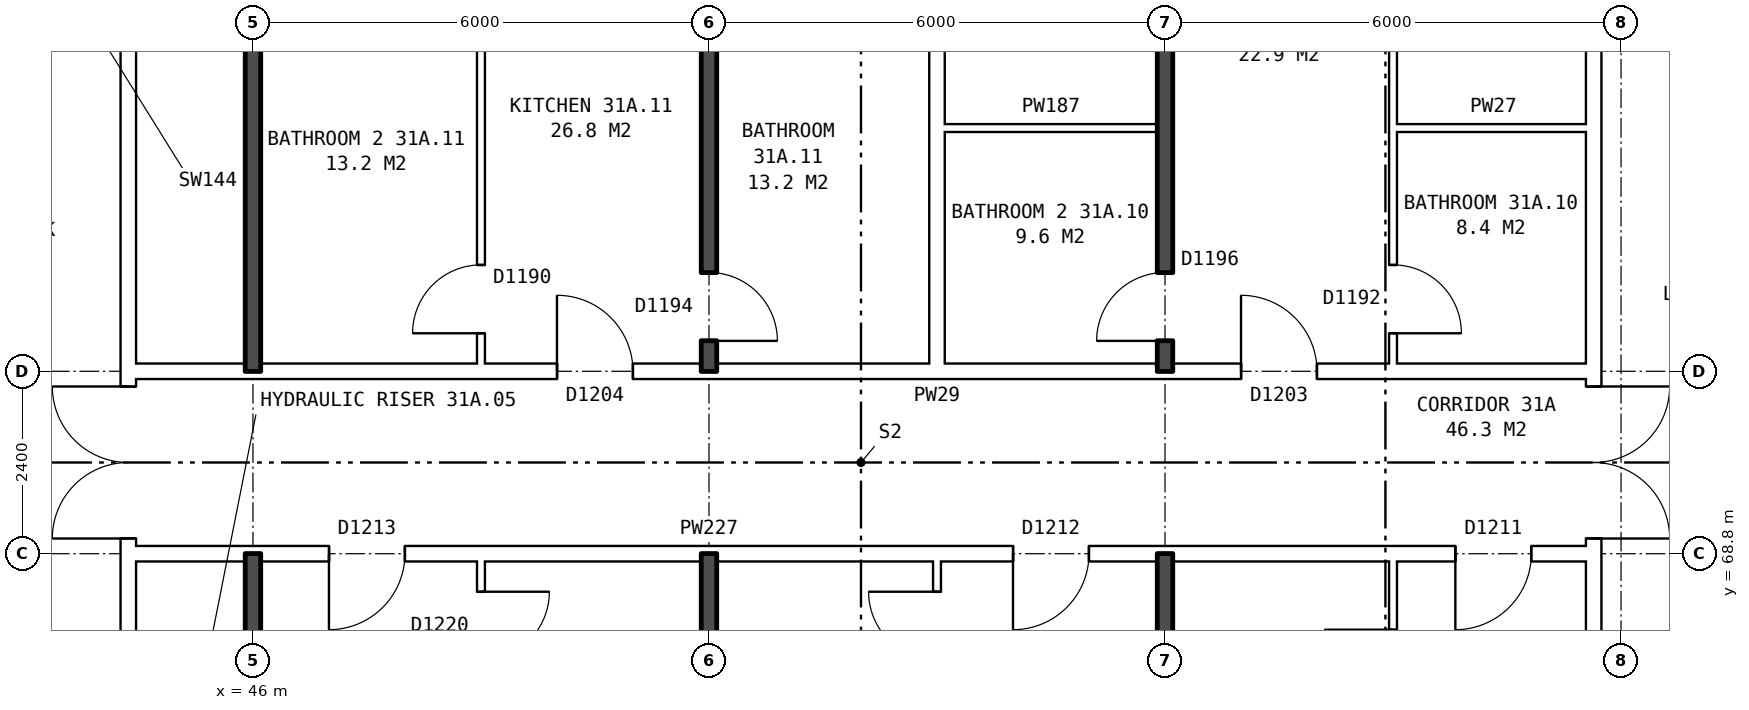
"""IFC4 building model, lengths in metres.
Left out: names, types, materials, properties, quantities, classifications, styles, units other than length and angle.
Written with IfcOpenShell. Run it as: python <this file> out.ifc"""

import sys

from ifc_helpers import new_model, si_unit, direction, frame, frame_2d, origin, place, context, subcontext, project, spatial, rectangle, extrude, element, fill, save


model = new_model("IFC4")
c1 = context("Model", 3, precision=1e-05, world=origin(), true_north=direction((0.0, 1.0)))
c2 = subcontext(c1, "Body", "Model", "MODEL_VIEW")
j1 = project(units=[si_unit("LENGTHUNIT", "METRE"), si_unit("PLANEANGLEUNIT", "RADIAN")], contexts=[c1])
p1 = place(None, origin())
s1 = spatial("IfcSite", under=j1, at=p1, CompositionType="ELEMENT")
p2 = place(p1, origin())
s2 = spatial("IfcBuilding", under=s1, at=p2, CompositionType="ELEMENT")
p3 = place(p2, frame((0.0, 0.0, 111.9)))
s3 = spatial("IfcBuildingStorey", under=s2, at=p3, CompositionType="ELEMENT", Elevation=111.9)
p4 = place(p3, frame((63.64, 63.9, 0.0), z_axis=(0.0, 0.0, 1.0), x_axis=(0.0, 1.0, 0.0)))
e1 = element("IfcWall", 1, at=p4, inside=s3, PredefinedType="PARTITIONING", context=c2, shape_type="SweptSolid", body=[
    extrude(rectangle(XDim=12.2, YDim=0.2, at=frame_2d((6.1, 0.0))), origin(), (0.0, 0.0, 1.0), 2.85),
])
p5 = place(p4, frame((5.1, 0.0, 0.0)))
e2 = element("IfcOpeningElement", 2, at=p5, cuts=e1, PredefinedType="OPENING", context=c2, shape_type="SweptSolid", body=[
    extrude(rectangle(XDim=2.0, YDim=2.1, at=frame_2d((1.0, 1.05))), frame((0.0, 0.11, 0.0), z_axis=(0.0, -1.0, 0.0), x_axis=(1.0, 0.0, 0.0)), (0.0, 0.0, 1.0), 0.22),
])
p6 = place(p3, frame((44.36, 63.9, 0.0), z_axis=(0.0, 0.0, 1.0), x_axis=(0.0, 1.0, 0.0)))
e3 = element("IfcWall", 3, at=p6, inside=s3, PredefinedType="PARTITIONING", context=c2, shape_type="SweptSolid", body=[
    extrude(rectangle(XDim=12.2, YDim=0.2, at=frame_2d((6.1, 0.0))), origin(), (0.0, 0.0, 1.0), 2.85),
])
p7 = place(p6, frame((5.1, 0.0, 0.0)))
e4 = element("IfcOpeningElement", 4, at=p7, cuts=e3, PredefinedType="OPENING", context=c2, shape_type="SweptSolid", body=[
    extrude(rectangle(XDim=2.0, YDim=2.1, at=frame_2d((1.0, 1.05))), frame((0.0, 0.11, 0.0), z_axis=(0.0, -1.0, 0.0), x_axis=(1.0, 0.0, 0.0)), (0.0, 0.0, 1.0), 0.22),
])
p8 = place(p3, frame((44.36, 68.8, 0.0), z_axis=(0.0, 0.0, 1.0), x_axis=(1.0, 0.0, 0.0)))
e5 = element("IfcWall", 5, at=p8, inside=s3, PredefinedType="PARTITIONING", context=c2, shape_type="SweptSolid", body=[
    extrude(rectangle(XDim=19.28, YDim=0.2, at=frame_2d((9.64, 0.0))), origin(), (0.0, 0.0, 1.0), 2.85),
])
p9 = place(p8, frame((17.46, 0.0, 0.0)))
e6 = element("IfcOpeningElement", 6, at=p9, cuts=e5, PredefinedType="OPENING", context=c2, shape_type="SweptSolid", body=[
    extrude(rectangle(XDim=1.0, YDim=2.1, at=frame_2d((0.5, 1.05))), frame((0.0, 0.11, 0.0), z_axis=(0.0, -1.0, 0.0), x_axis=(1.0, 0.0, 0.0)), (0.0, 0.0, 1.0), 0.22),
])
p10 = place(p8, frame((11.64, 0.0, 0.0)))
e7 = element("IfcOpeningElement", 7, at=p10, cuts=e5, PredefinedType="OPENING", context=c2, shape_type="SweptSolid", body=[
    extrude(rectangle(XDim=1.0, YDim=2.1, at=frame_2d((0.5, 1.05))), frame((0.0, 0.11, 0.0), z_axis=(0.0, -1.0, 0.0), x_axis=(1.0, 0.0, 0.0)), (0.0, 0.0, 1.0), 0.22),
])
p11 = place(p8, frame((2.64, 0.0, 0.0)))
e8 = element("IfcOpeningElement", 8, at=p11, cuts=e5, PredefinedType="OPENING", context=c2, shape_type="SweptSolid", body=[
    extrude(rectangle(XDim=1.0, YDim=2.1, at=frame_2d((0.5, 1.05))), frame((0.0, 0.11, 0.0), z_axis=(0.0, -1.0, 0.0), x_axis=(1.0, 0.0, 0.0)), (0.0, 0.0, 1.0), 0.22),
])
p12 = place(p3, frame((44.36, 71.2, 0.0), z_axis=(0.0, 0.0, 1.0), x_axis=(1.0, 0.0, 0.0)))
e9 = element("IfcWall", 9, at=p12, inside=s3, PredefinedType="PARTITIONING", context=c2, shape_type="SweptSolid", body=[
    extrude(rectangle(XDim=19.28, YDim=0.2, at=frame_2d((9.64, 0.0))), origin(), (0.0, 0.0, 1.0), 2.85),
])
p13 = place(p12, frame((14.64, 0.0, 0.0)))
e10 = element("IfcOpeningElement", 10, at=p13, cuts=e9, PredefinedType="OPENING", context=c2, shape_type="SweptSolid", body=[
    extrude(rectangle(XDim=1.0, YDim=2.1, at=frame_2d((0.5, 1.05))), frame((0.0, 0.11, 0.0), z_axis=(0.0, -1.0, 0.0), x_axis=(1.0, 0.0, 0.0)), (0.0, 0.0, 1.0), 0.22),
])
p14 = place(p12, frame((5.64, 0.0, 0.0)))
e11 = element("IfcOpeningElement", 11, at=p14, cuts=e9, PredefinedType="OPENING", context=c2, shape_type="SweptSolid", body=[
    extrude(rectangle(XDim=1.0, YDim=2.1, at=frame_2d((0.5, 1.05))), frame((0.0, 0.11, 0.0), z_axis=(0.0, -1.0, 0.0), x_axis=(1.0, 0.0, 0.0)), (0.0, 0.0, 1.0), 0.22),
])
p15 = place(p3, frame((55.1, 74.4, 0.0), z_axis=(0.0, 0.0, 1.0), x_axis=(1.0, 0.0, 0.0)))
e12 = element("IfcWall", 12, at=p15, inside=s3, PredefinedType="PARTITIONING", context=c2, shape_type="SweptSolid", body=[
    extrude(rectangle(XDim=2.8, YDim=0.1, at=frame_2d((1.4, 0.0))), origin(), (0.0, 0.0, 1.0), 2.85),
])
p16 = place(p3, frame((61.0, 74.4, 0.0), z_axis=(0.0, 0.0, 1.0), x_axis=(1.0, 0.0, 0.0)))
e13 = element("IfcWall", 13, at=p16, inside=s3, PredefinedType="PARTITIONING", context=c2, shape_type="SweptSolid", body=[
    extrude(rectangle(XDim=2.64, YDim=0.1, at=frame_2d((1.32, 0.0))), origin(), (0.0, 0.0, 1.0), 2.85),
])
for number, where, z_axis, x_axis in (
    (14, (46.0, 63.8, 0.0), (0.0, 0.0, 1.0), (0.0, 1.0, 0.0)),
    (15, (46.0, 71.2, 0.0), (0.0, 0.0, 1.0), (0.0, 1.0, 0.0)),
):
    element("IfcWall", number, at=place(p3, frame(where, z_axis=z_axis, x_axis=x_axis)), inside=s3, PredefinedType="SOLIDWALL", context=c2, shape_type="SweptSolid", body=[
        extrude(rectangle(XDim=5.0, YDim=0.2, at=frame_2d((2.5, 0.0))), origin(), (0.0, 0.0, 1.0), 2.85),
    ])
p17 = place(p3, frame((49.0, 54.36, 0.0), z_axis=(0.0, 0.0, 1.0), x_axis=(0.0, 1.0, 0.0)))
e16 = element("IfcWall", 16, at=p17, inside=s3, PredefinedType="PARTITIONING", context=c2, shape_type="SweptSolid", body=[
    extrude(rectangle(XDim=14.34, YDim=0.1, at=frame_2d((7.17, 0.0))), origin(), (0.0, 0.0, 1.0), 2.85),
])
p18 = place(p17, frame((6.7, 0.0, 0.0)))
e17 = element("IfcOpeningElement", 17, at=p18, cuts=e16, PredefinedType="OPENING", context=c2, shape_type="SweptSolid", body=[
    extrude(rectangle(XDim=0.9, YDim=2.1, at=frame_2d((0.45, 1.05))), frame((0.0, 0.06, 0.0), z_axis=(0.0, -1.0, 0.0), x_axis=(1.0, 0.0, 0.0)), (0.0, 0.0, 1.0), 0.12),
])
p19 = place(p17, frame((13.04, 0.0, 0.0)))
e18 = element("IfcOpeningElement", 18, at=p19, cuts=e16, PredefinedType="OPENING", context=c2, shape_type="SweptSolid", body=[
    extrude(rectangle(XDim=0.9, YDim=2.1, at=frame_2d((0.45, 1.05))), frame((0.0, 0.06, 0.0), z_axis=(0.0, -1.0, 0.0), x_axis=(1.0, 0.0, 0.0)), (0.0, 0.0, 1.0), 0.12),
])
p20 = place(p3, frame((49.0, 71.3, 0.0), z_axis=(0.0, 0.0, 1.0), x_axis=(0.0, 1.0, 0.0)))
e19 = element("IfcWall", 19, at=p20, inside=s3, PredefinedType="PARTITIONING", context=c2, shape_type="SweptSolid", body=[
    extrude(rectangle(XDim=14.34, YDim=0.1, at=frame_2d((7.17, 0.0))), origin(), (0.0, 0.0, 1.0), 2.85),
])
p21 = place(p20, frame((9.24, 0.0, 0.0)))
e20 = element("IfcOpeningElement", 20, at=p21, cuts=e19, PredefinedType="OPENING", context=c2, shape_type="SweptSolid", body=[
    extrude(rectangle(XDim=0.9, YDim=2.1, at=frame_2d((0.45, 1.05))), frame((0.0, 0.06, 0.0), z_axis=(0.0, -1.0, 0.0), x_axis=(1.0, 0.0, 0.0)), (0.0, 0.0, 1.0), 0.12),
])
p22 = place(p20, frame((0.4, 0.0, 0.0)))
e21 = element("IfcOpeningElement", 21, at=p22, cuts=e19, PredefinedType="OPENING", context=c2, shape_type="SweptSolid", body=[
    extrude(rectangle(XDim=0.9, YDim=2.1, at=frame_2d((0.45, 1.05))), frame((0.0, 0.06, 0.0), z_axis=(0.0, -1.0, 0.0), x_axis=(1.0, 0.0, 0.0)), (0.0, 0.0, 1.0), 0.12),
])
p23 = place(p3, frame((52.0, 54.36, 0.0), z_axis=(0.0, 0.0, 1.0), x_axis=(0.0, 1.0, 0.0)))
e22 = element("IfcWall", 22, at=p23, inside=s3, PredefinedType="SOLIDWALL", context=c2, shape_type="SweptSolid", body=[
    extrude(rectangle(XDim=14.44, YDim=0.2, at=frame_2d((7.22, 0.0))), origin(), (0.0, 0.0, 1.0), 2.85),
])
p24 = place(p3, frame((52.0, 71.2, 0.0), z_axis=(0.0, 0.0, 1.0), x_axis=(0.0, 1.0, 0.0)))
e23 = element("IfcWall", 23, at=p24, inside=s3, PredefinedType="SOLIDWALL", context=c2, shape_type="SweptSolid", body=[
    extrude(rectangle(XDim=14.44, YDim=0.2, at=frame_2d((7.22, 0.0))), origin(), (0.0, 0.0, 1.0), 2.85),
])
p25 = place(p24, frame((9.34, 0.0, 0.0)))
e24 = element("IfcOpeningElement", 24, at=p25, cuts=e23, PredefinedType="OPENING", context=c2, shape_type="SweptSolid", body=[
    extrude(rectangle(XDim=0.9, YDim=2.1, at=frame_2d((0.45, 1.05))), frame((0.0, 0.11, 0.0), z_axis=(0.0, -1.0, 0.0), x_axis=(1.0, 0.0, 0.0)), (0.0, 0.0, 1.0), 0.22),
])
p26 = place(p24, frame((0.4, 0.0, 0.0)))
e25 = element("IfcOpeningElement", 25, at=p26, cuts=e23, PredefinedType="OPENING", context=c2, shape_type="SweptSolid", body=[
    extrude(rectangle(XDim=0.9, YDim=2.1, at=frame_2d((0.45, 1.05))), frame((0.0, 0.11, 0.0), z_axis=(0.0, -1.0, 0.0), x_axis=(1.0, 0.0, 0.0)), (0.0, 0.0, 1.0), 0.22),
])
p27 = place(p3, frame((55.0, 54.36, 0.0), z_axis=(0.0, 0.0, 1.0), x_axis=(0.0, 1.0, 0.0)))
e26 = element("IfcWall", 26, at=p27, inside=s3, PredefinedType="PARTITIONING", context=c2, shape_type="SweptSolid", body=[
    extrude(rectangle(XDim=14.34, YDim=0.1, at=frame_2d((7.17, 0.0))), origin(), (0.0, 0.0, 1.0), 2.85),
])
p28 = place(p27, frame((7.7, 0.0, 0.0)))
e27 = element("IfcOpeningElement", 27, at=p28, cuts=e26, PredefinedType="OPENING", context=c2, shape_type="SweptSolid", body=[
    extrude(rectangle(XDim=0.9, YDim=2.1, at=frame_2d((0.45, 1.05))), frame((0.0, 0.06, 0.0), z_axis=(0.0, -1.0, 0.0), x_axis=(1.0, 0.0, 0.0)), (0.0, 0.0, 1.0), 0.12),
])
p29 = place(p27, frame((13.04, 0.0, 0.0)))
e28 = element("IfcOpeningElement", 28, at=p29, cuts=e26, PredefinedType="OPENING", context=c2, shape_type="SweptSolid", body=[
    extrude(rectangle(XDim=0.9, YDim=2.1, at=frame_2d((0.45, 1.05))), frame((0.0, 0.06, 0.0), z_axis=(0.0, -1.0, 0.0), x_axis=(1.0, 0.0, 0.0)), (0.0, 0.0, 1.0), 0.12),
])
p30 = place(p3, frame((55.0, 71.3, 0.0), z_axis=(0.0, 0.0, 1.0), x_axis=(0.0, 1.0, 0.0)))
e29 = element("IfcWall", 29, at=p30, inside=s3, PredefinedType="PARTITIONING", context=c2, shape_type="SweptSolid", body=[
    extrude(rectangle(XDim=14.34, YDim=0.2, at=frame_2d((7.17, 0.0))), origin(), (0.0, 0.0, 1.0), 2.85),
])
p31 = place(p3, frame((58.0, 54.36, 0.0), z_axis=(0.0, 0.0, 1.0), x_axis=(0.0, 1.0, 0.0)))
e30 = element("IfcWall", 30, at=p31, inside=s3, PredefinedType="SOLIDWALL", context=c2, shape_type="SweptSolid", body=[
    extrude(rectangle(XDim=14.44, YDim=0.2, at=frame_2d((7.22, 0.0))), origin(), (0.0, 0.0, 1.0), 2.85),
])
p32 = place(p3, frame((58.0, 71.2, 0.0), z_axis=(0.0, 0.0, 1.0), x_axis=(0.0, 1.0, 0.0)))
e31 = element("IfcWall", 31, at=p32, inside=s3, PredefinedType="SOLIDWALL", context=c2, shape_type="SweptSolid", body=[
    extrude(rectangle(XDim=14.44, YDim=0.2, at=frame_2d((7.22, 0.0))), origin(), (0.0, 0.0, 1.0), 2.85),
])
p33 = place(p32, frame((8.04, 0.0, 0.0)))
e32 = element("IfcOpeningElement", 32, at=p33, cuts=e31, PredefinedType="OPENING", context=c2, shape_type="SweptSolid", body=[
    extrude(rectangle(XDim=0.9, YDim=2.1, at=frame_2d((0.45, 1.05))), frame((0.0, 0.11, 0.0), z_axis=(0.0, -1.0, 0.0), x_axis=(1.0, 0.0, 0.0)), (0.0, 0.0, 1.0), 0.22),
])
p34 = place(p32, frame((0.4, 0.0, 0.0)))
e33 = element("IfcOpeningElement", 33, at=p34, cuts=e31, PredefinedType="OPENING", context=c2, shape_type="SweptSolid", body=[
    extrude(rectangle(XDim=0.9, YDim=2.1, at=frame_2d((0.45, 1.05))), frame((0.0, 0.11, 0.0), z_axis=(0.0, -1.0, 0.0), x_axis=(1.0, 0.0, 0.0)), (0.0, 0.0, 1.0), 0.22),
])
p35 = place(p3, frame((61.0, 54.36, 0.0), z_axis=(0.0, 0.0, 1.0), x_axis=(0.0, 1.0, 0.0)))
e34 = element("IfcWall", 34, at=p35, inside=s3, PredefinedType="PARTITIONING", context=c2, shape_type="SweptSolid", body=[
    extrude(rectangle(XDim=14.34, YDim=0.1, at=frame_2d((7.17, 0.0))), origin(), (0.0, 0.0, 1.0), 2.85),
])
p36 = place(p35, frame((5.5, 0.0, 0.0)))
e35 = element("IfcOpeningElement", 35, at=p36, cuts=e34, PredefinedType="OPENING", context=c2, shape_type="SweptSolid", body=[
    extrude(rectangle(XDim=0.9, YDim=2.1, at=frame_2d((0.45, 1.05))), frame((0.0, 0.06, 0.0), z_axis=(0.0, -1.0, 0.0), x_axis=(1.0, 0.0, 0.0)), (0.0, 0.0, 1.0), 0.12),
])
p37 = place(p35, frame((12.54, 0.0, 0.0)))
e36 = element("IfcOpeningElement", 36, at=p37, cuts=e34, PredefinedType="OPENING", context=c2, shape_type="SweptSolid", body=[
    extrude(rectangle(XDim=0.9, YDim=2.1, at=frame_2d((0.45, 1.05))), frame((0.0, 0.06, 0.0), z_axis=(0.0, -1.0, 0.0), x_axis=(1.0, 0.0, 0.0)), (0.0, 0.0, 1.0), 0.12),
])
p38 = place(p3, frame((61.0, 71.3, 0.0), z_axis=(0.0, 0.0, 1.0), x_axis=(0.0, 1.0, 0.0)))
e37 = element("IfcWall", 37, at=p38, inside=s3, PredefinedType="PARTITIONING", context=c2, shape_type="SweptSolid", body=[
    extrude(rectangle(XDim=14.34, YDim=0.1, at=frame_2d((7.17, 0.0))), origin(), (0.0, 0.0, 1.0), 2.85),
])
p39 = place(p38, frame((7.94, 0.0, 0.0)))
e38 = element("IfcOpeningElement", 38, at=p39, cuts=e37, PredefinedType="OPENING", context=c2, shape_type="SweptSolid", body=[
    extrude(rectangle(XDim=0.9, YDim=2.1, at=frame_2d((0.45, 1.05))), frame((0.0, 0.06, 0.0), z_axis=(0.0, -1.0, 0.0), x_axis=(1.0, 0.0, 0.0)), (0.0, 0.0, 1.0), 0.12),
])
p40 = place(p38, frame((0.4, 0.0, 0.0)))
e39 = element("IfcOpeningElement", 39, at=p40, cuts=e37, PredefinedType="OPENING", context=c2, shape_type="SweptSolid", body=[
    extrude(rectangle(XDim=0.9, YDim=2.1, at=frame_2d((0.45, 1.05))), frame((0.0, 0.06, 0.0), z_axis=(0.0, -1.0, 0.0), x_axis=(1.0, 0.0, 0.0)), (0.0, 0.0, 1.0), 0.12),
])
p41 = place(p5, frame((2.0, 0.0, 0.0), z_axis=(0.0, 0.0, 1.0), x_axis=(-1.0, 0.0, 0.0)))
e40 = element("IfcDoor", 40, at=p41, inside=s3, OperationType="DOUBLE_DOOR_SINGLE_SWING", PredefinedType="DOOR", context=c2, shape_type="SweptSolid", body=[
    extrude(rectangle(XDim=2.0, YDim=2.1, at=frame_2d((1.0, 1.05))), frame((0.0, 0.025, 0.0), z_axis=(0.0, -1.0, 0.0), x_axis=(1.0, 0.0, 0.0)), (0.0, 0.0, 1.0), 0.05),
])
fill(e2, e40)
p42 = place(p7, origin())
e41 = element("IfcDoor", 41, at=p42, inside=s3, OperationType="DOUBLE_DOOR_SINGLE_SWING", PredefinedType="DOOR", context=c2, shape_type="SweptSolid", body=[
    extrude(rectangle(XDim=2.0, YDim=2.1, at=frame_2d((1.0, 1.05))), frame((0.0, 0.025, 0.0), z_axis=(0.0, -1.0, 0.0), x_axis=(1.0, 0.0, 0.0)), (0.0, 0.0, 1.0), 0.05),
])
fill(e4, e41)
p43 = place(p9, frame((1.0, 0.0, 0.0), z_axis=(0.0, 0.0, 1.0), x_axis=(-1.0, 0.0, 0.0)))
e42 = element("IfcDoor", 42, at=p43, inside=s3, OperationType="SINGLE_SWING_RIGHT", PredefinedType="DOOR", context=c2, shape_type="SweptSolid", body=[
    extrude(rectangle(XDim=1.0, YDim=2.1, at=frame_2d((0.5, 1.05))), frame((0.0, 0.025, 0.0), z_axis=(0.0, -1.0, 0.0), x_axis=(1.0, 0.0, 0.0)), (0.0, 0.0, 1.0), 0.05),
])
fill(e6, e42)
p44 = place(p10, frame((1.0, 0.0, 0.0), z_axis=(0.0, 0.0, 1.0), x_axis=(-1.0, 0.0, 0.0)))
e43 = element("IfcDoor", 43, at=p44, inside=s3, OperationType="SINGLE_SWING_RIGHT", PredefinedType="DOOR", context=c2, shape_type="SweptSolid", body=[
    extrude(rectangle(XDim=1.0, YDim=2.1, at=frame_2d((0.5, 1.05))), frame((0.0, 0.025, 0.0), z_axis=(0.0, -1.0, 0.0), x_axis=(1.0, 0.0, 0.0)), (0.0, 0.0, 1.0), 0.05),
])
fill(e7, e43)
p45 = place(p29, origin())
e44 = element("IfcDoor", 44, at=p45, inside=s3, OperationType="SINGLE_SWING_RIGHT", PredefinedType="DOOR", context=c2, shape_type="SweptSolid", body=[
    extrude(rectangle(XDim=0.9, YDim=2.1, at=frame_2d((0.45, 1.05))), frame((0.0, 0.025, 0.0), z_axis=(0.0, -1.0, 0.0), x_axis=(1.0, 0.0, 0.0)), (0.0, 0.0, 1.0), 0.05),
])
fill(e28, e44)
p46 = place(p11, frame((1.0, 0.0, 0.0), z_axis=(0.0, 0.0, 1.0), x_axis=(-1.0, 0.0, 0.0)))
e45 = element("IfcDoor", 45, at=p46, inside=s3, OperationType="SINGLE_SWING_RIGHT", PredefinedType="DOOR", context=c2, shape_type="SweptSolid", body=[
    extrude(rectangle(XDim=1.0, YDim=2.1, at=frame_2d((0.5, 1.05))), frame((0.0, 0.025, 0.0), z_axis=(0.0, -1.0, 0.0), x_axis=(1.0, 0.0, 0.0)), (0.0, 0.0, 1.0), 0.05),
])
fill(e8, e45)
p47 = place(p19, frame((0.9, 0.0, 0.0), z_axis=(0.0, 0.0, 1.0), x_axis=(-1.0, 0.0, 0.0)))
e46 = element("IfcDoor", 46, at=p47, inside=s3, OperationType="SINGLE_SWING_LEFT", PredefinedType="DOOR", context=c2, shape_type="SweptSolid", body=[
    extrude(rectangle(XDim=0.9, YDim=2.1, at=frame_2d((0.45, 1.05))), frame((0.0, 0.025, 0.0), z_axis=(0.0, -1.0, 0.0), x_axis=(1.0, 0.0, 0.0)), (0.0, 0.0, 1.0), 0.05),
])
fill(e18, e46)
p48 = place(p13, origin())
e47 = element("IfcDoor", 47, at=p48, inside=s3, OperationType="SINGLE_SWING_LEFT", PredefinedType="DOOR", context=c2, shape_type="SweptSolid", body=[
    extrude(rectangle(XDim=1.0, YDim=2.1, at=frame_2d((0.5, 1.05))), frame((0.0, 0.025, 0.0), z_axis=(0.0, -1.0, 0.0), x_axis=(1.0, 0.0, 0.0)), (0.0, 0.0, 1.0), 0.05),
])
fill(e10, e47)
p49 = place(p40, frame((0.9, 0.0, 0.0), z_axis=(0.0, 0.0, 1.0), x_axis=(-1.0, 0.0, 0.0)))
e48 = element("IfcDoor", 48, at=p49, inside=s3, OperationType="SINGLE_SWING_RIGHT", PredefinedType="DOOR", context=c2, shape_type="SweptSolid", body=[
    extrude(rectangle(XDim=0.9, YDim=2.1, at=frame_2d((0.45, 1.05))), frame((0.0, 0.025, 0.0), z_axis=(0.0, -1.0, 0.0), x_axis=(1.0, 0.0, 0.0)), (0.0, 0.0, 1.0), 0.05),
])
fill(e39, e48)
p50 = place(p34, origin())
e49 = element("IfcDoor", 49, at=p50, inside=s3, OperationType="SINGLE_SWING_LEFT", PredefinedType="DOOR", context=c2, shape_type="SweptSolid", body=[
    extrude(rectangle(XDim=0.9, YDim=2.1, at=frame_2d((0.45, 1.05))), frame((0.0, 0.025, 0.0), z_axis=(0.0, -1.0, 0.0), x_axis=(1.0, 0.0, 0.0)), (0.0, 0.0, 1.0), 0.05),
])
fill(e33, e49)
p51 = place(p14, origin())
e50 = element("IfcDoor", 50, at=p51, inside=s3, OperationType="SINGLE_SWING_LEFT", PredefinedType="DOOR", context=c2, shape_type="SweptSolid", body=[
    extrude(rectangle(XDim=1.0, YDim=2.1, at=frame_2d((0.5, 1.05))), frame((0.0, 0.025, 0.0), z_axis=(0.0, -1.0, 0.0), x_axis=(1.0, 0.0, 0.0)), (0.0, 0.0, 1.0), 0.05),
])
fill(e11, e50)
p52 = place(p26, frame((0.9, 0.0, 0.0), z_axis=(0.0, 0.0, 1.0), x_axis=(-1.0, 0.0, 0.0)))
e51 = element("IfcDoor", 51, at=p52, inside=s3, OperationType="SINGLE_SWING_RIGHT", PredefinedType="DOOR", context=c2, shape_type="SweptSolid", body=[
    extrude(rectangle(XDim=0.9, YDim=2.1, at=frame_2d((0.45, 1.05))), frame((0.0, 0.025, 0.0), z_axis=(0.0, -1.0, 0.0), x_axis=(1.0, 0.0, 0.0)), (0.0, 0.0, 1.0), 0.05),
])
fill(e25, e51)
p53 = place(p22, origin())
e52 = element("IfcDoor", 52, at=p53, inside=s3, OperationType="SINGLE_SWING_LEFT", PredefinedType="DOOR", context=c2, shape_type="SweptSolid", body=[
    extrude(rectangle(XDim=0.9, YDim=2.1, at=frame_2d((0.45, 1.05))), frame((0.0, 0.025, 0.0), z_axis=(0.0, -1.0, 0.0), x_axis=(1.0, 0.0, 0.0)), (0.0, 0.0, 1.0), 0.05),
])
fill(e21, e52)
save(model, sys.argv[1])
